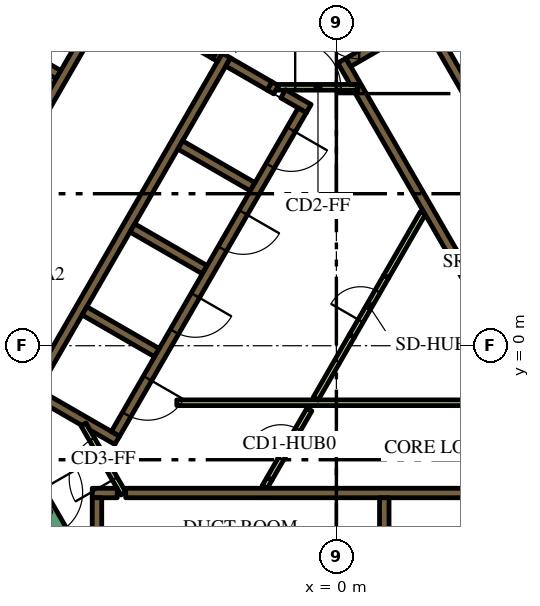
"""IFC4 building model, lengths in metres.
Left out: names, types, materials, properties, quantities, classifications, styles, units other than length and angle.
Written with IfcOpenShell. Run it as: python <this file> out.ifc"""

import sys

from ifc_helpers import new_model, si_unit, direction, frame, frame_2d, origin, place, context, subcontext, project, spatial, polyline, rectangle, outline, extrude, element, fill, save


model = new_model("IFC4")
c1 = context("Model", 3, precision=1e-05, world=origin(), true_north=direction((0.0, 1.0)))
c2 = subcontext(c1, "Body", "Model", "MODEL_VIEW")
j1 = project(units=[si_unit("LENGTHUNIT", "METRE"), si_unit("PLANEANGLEUNIT", "RADIAN")], contexts=[c1])
p1 = place(None, origin())
s1 = spatial("IfcSite", under=j1, at=p1, CompositionType="ELEMENT")
p2 = place(p1, origin())
s2 = spatial("IfcBuilding", under=s1, at=p2, CompositionType="ELEMENT")
p3 = place(p2, frame((0.0, 0.0, 91.5)))
s3 = spatial("IfcBuildingStorey", under=s2, at=p3, CompositionType="ELEMENT", Elevation=91.5)
p4 = place(p3, frame((-15.36, -1.503, 0.0), z_axis=(0.0, 0.0, 1.0), x_axis=(0.50000389221, 0.866023156604, 0.0)))
e1 = element("IfcWall", 1, at=p4, inside=s3, PredefinedType="SOLIDWALL", context=c2, shape_type="SweptSolid", body=[
    extrude(rectangle(XDim=21.0, YDim=0.9, at=frame_2d((10.5, 0.0))), origin(), (0.0, 0.0, 1.0), 3.9),
])
p5 = place(p3, frame((-5.545, -3.875, 0.0), z_axis=(0.0, 0.0, 1.0), x_axis=(1.0, 0.0, 0.0)))
e2 = element("IfcWall", 2, at=p5, inside=s3, PredefinedType="SOLIDWALL", context=c2, shape_type="SweptSolid", body=[
    extrude(rectangle(XDim=11.97, YDim=0.25, at=frame_2d((5.985, 0.0))), origin(), (0.0, 0.0, 1.0), 3.9),
])
p6 = place(p3, frame((-6.425, -3.875, 0.0), z_axis=(0.0, 0.0, 1.0), x_axis=(1.0, 0.0, 0.0)))
e3 = element("IfcWall", 3, at=p6, inside=s3, PredefinedType="SOLIDWALL", context=c2, shape_type="SweptSolid", body=[
    extrude(rectangle(XDim=0.658, YDim=0.25, at=frame_2d((0.329, 0.0))), origin(), (0.0, 0.0, 1.0), 3.9),
])
p7 = place(p3, frame((1.26, -4.0, 0.0), z_axis=(0.0, 0.0, 1.0), x_axis=(0.0, -1.0, 0.0)))
e4 = element("IfcWall", 4, at=p7, inside=s3, PredefinedType="SOLIDWALL", context=c2, shape_type="SweptSolid", body=[
    extrude(rectangle(XDim=2.2, YDim=0.25, at=frame_2d((1.1, 0.0))), origin(), (0.0, 0.0, 1.0), 3.9),
])
p8 = place(p3, frame((-6.3, -4.0, 0.0), z_axis=(0.0, 0.0, 1.0), x_axis=(0.0, -1.0, 0.0)))
e5 = element("IfcWall", 5, at=p8, inside=s3, PredefinedType="SOLIDWALL", context=c2, shape_type="SweptSolid", body=[
    extrude(rectangle(XDim=3.154, YDim=0.25, at=frame_2d((1.577, 0.0))), origin(), (0.0, 0.0, 1.0), 3.9),
])
p9 = place(p3, origin())
e6 = element("IfcWall", 6, at=p9, inside=s3, PredefinedType="SOLIDWALL", context=c2, shape_type="SweptSolid", body=[
    extrude(outline(polyline([(0.566, 6.725), (0.566, 6.875), (0.566, 6.875), (0.565, 6.875), (0.361, 6.875), (0.035, 7.439), (0.252, 7.564), (0.377, 7.348), (6.552, -3.348), (6.677, -3.564), (6.46, -3.689), (0.448, 6.725), (0.565, 6.725), (0.566, 6.725), (0.566, 6.725)])), origin(), (0.0, 0.0, 1.0), 3.9),
])
p10 = place(p3, frame((0.314, 7.456, 0.0), z_axis=(0.0, 0.0, 1.0), x_axis=(0.866013897511, 0.50001992892, 0.0)))
e7 = element("IfcWall", 7, at=p10, inside=s3, PredefinedType="SOLIDWALL", context=c2, shape_type="SweptSolid", body=[
    extrude(rectangle(XDim=3.268, YDim=0.25, at=frame_2d((1.634, 0.0))), origin(), (0.0, 0.0, 1.0), 3.9),
])
p11 = place(p3, frame((-8.06, -1.311, 0.0), z_axis=(0.0, 0.0, 1.0), x_axis=(0.50000273126, 0.866023826885, 0.0)))
e8 = element("IfcWall", 8, at=p11, inside=s3, PredefinedType="SOLIDWALL", context=c2, shape_type="SweptSolid", body=[
    extrude(rectangle(XDim=10.33, YDim=0.25, at=frame_2d((5.165, 0.0))), origin(), (0.0, 0.0, 1.0), 3.9),
])
p12 = place(p3, frame((-1.758, 6.835, 0.0), z_axis=(0.0, 0.0, 1.0), x_axis=(0.865982457891, -0.500074377092, 0.0)))
e9 = element("IfcWall", 9, at=p12, inside=s3, PredefinedType="SOLIDWALL", context=c2, shape_type="SweptSolid", body=[
    extrude(rectangle(XDim=0.2, YDim=0.25, at=frame_2d((0.1, 0.0))), origin(), (0.0, 0.0, 1.0), 3.9),
])
p13 = place(p3, frame((-1.76, 6.836, 0.0), z_axis=(0.0, 0.0, 1.0), x_axis=(-0.865952863304, 0.500125622755, 0.0)))
e10 = element("IfcWall", 10, at=p13, inside=s3, PredefinedType="SOLIDWALL", context=c2, shape_type="SweptSolid", body=[
    extrude(rectangle(XDim=1.258, YDim=0.25, at=frame_2d((0.629, 0.0))), origin(), (0.0, 0.0, 1.0), 3.9),
])
p14 = place(p3, frame((-0.728, 6.24, 0.0), z_axis=(0.0, 0.0, 1.0), x_axis=(-0.865955664968, 0.500120771724, 0.0)))
e11 = element("IfcWall", 11, at=p14, inside=s3, PredefinedType="SOLIDWALL", context=c2, shape_type="SweptSolid", body=[
    extrude(rectangle(XDim=0.778, YDim=0.25, at=frame_2d((0.389, 0.0))), origin(), (0.0, 0.0, 1.0), 3.9),
])
for number, where, z_axis, x_axis in (
    (12, (-2.204, 4.182, 0.0), (0.0, 0.0, 1.0), (-0.866, 0.5, 0.0)),
    (13, (-5.369, 3.1, 0.0), (0.0, 0.0, 1.0), (0.866, -0.5, 0.0)),
    (14, (-4.724, -0.182, 0.0), (0.0, 0.0, 1.0), (-0.866, 0.5, 0.0)),
):
    element("IfcWall", number, at=place(p3, frame(where, z_axis=z_axis, x_axis=x_axis)), inside=s3, PredefinedType="SOLIDWALL", context=c2, shape_type="SweptSolid", body=[
        extrude(rectangle(XDim=2.2, YDim=0.25, at=frame_2d((1.1, 0.0))), origin(), (0.0, 0.0, 1.0), 3.9),
    ])
e15 = element("IfcWall", 15, at=p9, inside=s3, PredefinedType="SOLIDWALL", context=c2, shape_type="SweptSolid", body=[
    extrude(outline(polyline([(-5.922, -2.257), (-5.922, -2.257), (-5.705, -2.382), (-5.83, -2.598), (-6.483, -2.221), (-6.591, -2.033), (-6.591, -2.033), (-6.7, -2.096), (-7.952, -1.373), (-7.827, -1.156), (-5.922, -2.257)])), origin(), (0.0, 0.0, 1.0), 3.9),
])
e16 = element("IfcWall", 16, at=p9, inside=s3, PredefinedType="SOLIDWALL", context=c2, shape_type="SweptSolid", body=[
    extrude(outline(polyline([(-3.128, 7.481), (-3.259, 7.557), (-3.134, 7.773), (-3.003, 7.698), (-3.128, 7.481)])), origin(), (0.0, 0.0, 1.0), 3.9),
])
p15 = place(p3, frame((-7.314, 7.132, 0.0), z_axis=(0.0, 0.0, 1.0), x_axis=(-0.866008176907, 0.50002983664, 0.0)))
e17 = element("IfcWall", 17, at=p15, inside=s3, PredefinedType="SOLIDWALL", context=c2, shape_type="SweptSolid", body=[
    extrude(rectangle(XDim=2.2, YDim=0.25, at=frame_2d((1.1, 0.0))), origin(), (0.0, 0.0, 1.0), 3.9),
])
p16 = place(p3, frame((-1.887, -3.718, 0.0), z_axis=(0.0, 0.0, 1.0), x_axis=(0.500165633897, 0.865929753888, 0.0)))
e18 = element("IfcWall", 18, at=p16, inside=s3, PredefinedType="PARTITIONING", context=c2, shape_type="SweptSolid", body=[
    extrude(rectangle(XDim=0.254, YDim=0.15, at=frame_2d((0.127, 0.0))), origin(), (0.0, 0.0, 1.0), 2.75),
])
p17 = place(p3, frame((-4.2, -1.5, 0.0), z_axis=(0.0, 0.0, 1.0), x_axis=(1.0, 0.0, 0.0)))
e19 = element("IfcWall", 19, at=p17, inside=s3, PredefinedType="PARTITIONING", context=c2, shape_type="SweptSolid", body=[
    extrude(rectangle(XDim=9.359, YDim=0.15, at=frame_2d((4.68, 0.0))), origin(), (0.0, 0.0, 1.0), 2.75),
])
p18 = place(p3, frame((-0.544, -1.393, 0.0), z_axis=(0.0, 0.0, 1.0), x_axis=(0.499928740635, 0.866066541489, 0.0)))
e20 = element("IfcWall", 20, at=p18, inside=s3, PredefinedType="PARTITIONING", context=c2, shape_type="SweptSolid", body=[
    extrude(rectangle(XDim=1.912, YDim=0.15, at=frame_2d((0.956, 0.0))), origin(), (0.0, 0.0, 1.0), 2.75),
])
p19 = place(p3, frame((1.312, 1.822, 0.0), z_axis=(0.0, 0.0, 1.0), x_axis=(0.500003549559, 0.866023354436, 0.0)))
e21 = element("IfcWall", 21, at=p19, inside=s3, PredefinedType="PARTITIONING", context=c2, shape_type="SweptSolid", body=[
    extrude(rectangle(XDim=1.93, YDim=0.15, at=frame_2d((0.965, 0.0))), origin(), (0.0, 0.0, 1.0), 2.75),
])
p20 = place(p3, frame((8.565, -2.185, 0.0), z_axis=(0.0, 0.0, 1.0), x_axis=(-0.499997954832, 0.866026584559, 0.0)))
e22 = element("IfcWall", 22, at=p20, inside=s3, PredefinedType="SOLIDWALL", context=c2, shape_type="SweptSolid", body=[
    extrude(rectangle(XDim=12.35, YDim=0.25, at=frame_2d((6.175, 0.0))), origin(), (0.0, 0.0, 1.0), 3.9),
])
p21 = place(p20, frame((5.725, 0.0, 0.0)))
e23 = element("IfcOpeningElement", 23, at=p21, cuts=e22, PredefinedType="OPENING", context=c2, shape_type="SweptSolid", body=[
    extrude(rectangle(XDim=0.9, YDim=2.1, at=frame_2d((0.45, 1.05))), frame((0.0, 0.135, 0.0), z_axis=(0.0, -1.0, 0.0), x_axis=(1.0, 0.0, 0.0)), (0.0, 0.0, 1.0), 0.27),
])
p22 = place(p3, frame((-6.008, 9.144, 0.0), z_axis=(0.0, 0.0, 1.0), x_axis=(-0.500006956611, -0.866021387346, 0.0)))
e24 = element("IfcWall", 24, at=p22, inside=s3, PredefinedType="SOLIDWALL", context=c2, shape_type="SweptSolid", body=[
    extrude(rectangle(XDim=9.83, YDim=0.25, at=frame_2d((4.915, 0.0))), origin(), (0.0, 0.0, 1.0), 3.9),
])
p23 = place(p22, frame((6.985, 0.0, 0.0)))
e25 = element("IfcOpeningElement", 25, at=p23, cuts=e24, PredefinedType="OPENING", context=c2, shape_type="SweptSolid", body=[
    extrude(rectangle(XDim=0.9, YDim=2.1, at=frame_2d((0.45, 1.05))), frame((0.0, 0.135, 0.0), z_axis=(0.0, -1.0, 0.0), x_axis=(1.0, 0.0, 0.0)), (0.0, 0.0, 1.0), 0.27),
])
p24 = place(p3, frame((-0.898, 6.194, 0.0), z_axis=(0.0, 0.0, 1.0), x_axis=(-0.499996202215, -0.866027596426, 0.0)))
e26 = element("IfcWall", 26, at=p24, inside=s3, PredefinedType="SOLIDWALL", context=c2, shape_type="SweptSolid", body=[
    extrude(rectangle(XDim=9.83, YDim=0.25, at=frame_2d((4.915, 0.0))), origin(), (0.0, 0.0, 1.0), 3.9),
])
p25 = place(p24, frame((0.585, 0.0, 0.0)))
e27 = element("IfcOpeningElement", 27, at=p25, cuts=e26, PredefinedType="OPENING", context=c2, shape_type="SweptSolid", body=[
    extrude(rectangle(XDim=1.1, YDim=2.1, at=frame_2d((0.55, 1.05))), frame((0.0, 0.135, 0.0), z_axis=(0.0, -1.0, 0.0), x_axis=(1.0, 0.0, 0.0)), (0.0, 0.0, 1.0), 0.27),
])
p26 = place(p24, frame((3.105, 0.0, 0.0)))
e28 = element("IfcOpeningElement", 28, at=p26, cuts=e26, PredefinedType="OPENING", context=c2, shape_type="SweptSolid", body=[
    extrude(rectangle(XDim=1.1, YDim=2.1, at=frame_2d((0.55, 1.05))), frame((0.0, 0.135, 0.0), z_axis=(0.0, -1.0, 0.0), x_axis=(1.0, 0.0, 0.0)), (0.0, 0.0, 1.0), 0.27),
])
p27 = place(p24, frame((5.625, 0.0, 0.0)))
e29 = element("IfcOpeningElement", 29, at=p27, cuts=e26, PredefinedType="OPENING", context=c2, shape_type="SweptSolid", body=[
    extrude(rectangle(XDim=1.1, YDim=2.1, at=frame_2d((0.55, 1.05))), frame((0.0, 0.135, 0.0), z_axis=(0.0, -1.0, 0.0), x_axis=(1.0, 0.0, 0.0)), (0.0, 0.0, 1.0), 0.27),
])
p28 = place(p24, frame((8.145, 0.0, 0.0)))
e30 = element("IfcOpeningElement", 30, at=p28, cuts=e26, PredefinedType="OPENING", context=c2, shape_type="SweptSolid", body=[
    extrude(rectangle(XDim=1.1, YDim=2.1, at=frame_2d((0.55, 1.05))), frame((0.0, 0.135, 0.0), z_axis=(0.0, -1.0, 0.0), x_axis=(1.0, 0.0, 0.0)), (0.0, 0.0, 1.0), 0.27),
])
p29 = place(p3, frame((-8.103, -3.466, 0.0), z_axis=(0.0, 0.0, 1.0), x_axis=(0.500078061341, -0.865980330357, 0.0)))
e31 = element("IfcWall", 31, at=p29, inside=s3, PredefinedType="SOLIDWALL", context=c2, shape_type="SweptSolid", body=[
    extrude(rectangle(XDim=2.1, YDim=0.4, at=frame_2d((1.05, 0.0))), origin(), (0.0, 0.0, 1.0), 3.9),
])
p30 = place(p29, frame((0.45, 0.0, 0.0)))
e32 = element("IfcOpeningElement", 32, at=p30, cuts=e31, PredefinedType="OPENING", context=c2, shape_type="SweptSolid", body=[
    extrude(rectangle(XDim=1.2, YDim=2.1, at=frame_2d((0.6, 1.05))), frame((0.0, 0.21, 0.0), z_axis=(0.0, -1.0, 0.0), x_axis=(1.0, 0.0, 0.0)), (0.0, 0.0, 1.0), 0.42),
])
p31 = place(p3, frame((-1.76, -3.498, 0.0), z_axis=(0.0, 0.0, 1.0), x_axis=(0.499977374825, 0.866038466041, 0.0)))
e33 = element("IfcWall", 33, at=p31, inside=s3, PredefinedType="PARTITIONING", context=c2, shape_type="SweptSolid", body=[
    extrude(rectangle(XDim=2.1, YDim=0.15, at=frame_2d((1.05, 0.0))), origin(), (0.0, 0.0, 1.0), 2.75),
])
p32 = place(p31, frame((0.6, 0.0, 0.0)))
e34 = element("IfcOpeningElement", 34, at=p32, cuts=e33, PredefinedType="OPENING", context=c2, shape_type="SweptSolid", body=[
    extrude(rectangle(XDim=0.9, YDim=2.1, at=frame_2d((0.45, 1.05))), frame((0.0, 0.085, 0.0), z_axis=(0.0, -1.0, 0.0), x_axis=(1.0, 0.0, 0.0)), (0.0, 0.0, 1.0), 0.17),
])
p33 = place(p3, frame((-1.534, 6.8, 0.0), z_axis=(0.0, 0.0, 1.0), x_axis=(1.0, 0.0, 0.0)))
e35 = element("IfcWall", 35, at=p33, inside=s3, PredefinedType="PARTITIONING", context=c2, shape_type="SweptSolid", body=[
    extrude(rectangle(XDim=2.1, YDim=0.15, at=frame_2d((1.05, 0.0))), origin(), (0.0, 0.0, 1.0), 2.75),
])
p34 = place(p33, frame((0.45, 0.0, 0.0)))
e36 = element("IfcOpeningElement", 36, at=p34, cuts=e35, PredefinedType="OPENING", context=c2, shape_type="SweptSolid", body=[
    extrude(rectangle(XDim=1.2, YDim=2.1, at=frame_2d((0.6, 1.05))), frame((0.0, 0.085, 0.0), z_axis=(0.0, -1.0, 0.0), x_axis=(1.0, 0.0, 0.0)), (0.0, 0.0, 1.0), 0.17),
])
p35 = place(p3, frame((-5.606, -3.89, 0.0), z_axis=(0.0, 0.0, 1.0), x_axis=(-0.500027713859, 0.866009402589, 0.0)))
e37 = element("IfcWall", 37, at=p35, inside=s3, PredefinedType="PARTITIONING", context=c2, shape_type="SweptSolid", body=[
    extrude(rectangle(XDim=2.1, YDim=0.15, at=frame_2d((1.05, 0.0))), origin(), (0.0, 0.0, 1.0), 2.75),
])
p36 = place(p35, frame((0.45, 0.0, 0.0)))
e38 = element("IfcOpeningElement", 38, at=p36, cuts=e37, PredefinedType="OPENING", context=c2, shape_type="SweptSolid", body=[
    extrude(rectangle(XDim=1.2, YDim=2.1, at=frame_2d((0.6, 1.05))), frame((0.0, 0.085, 0.0), z_axis=(0.0, -1.0, 0.0), x_axis=(1.0, 0.0, 0.0)), (0.0, 0.0, 1.0), 0.17),
])
p37 = place(p3, frame((-4.409, 8.365, 0.0), z_axis=(0.0, 0.0, 1.0), x_axis=(0.866034573852, -0.49998411664, 0.0)))
e39 = element("IfcWall", 39, at=p37, inside=s3, PredefinedType="SOLIDWALL", context=c2, shape_type="SweptSolid", body=[
    extrude(rectangle(XDim=1.4, YDim=0.25, at=frame_2d((0.7, 0.0))), origin(), (0.0, 0.0, 1.0), 3.9),
])
p38 = place(p37, frame((0.1, 0.0, 0.0)))
e40 = element("IfcOpeningElement", 40, at=p38, cuts=e39, PredefinedType="OPENING", context=c2, shape_type="SweptSolid", body=[
    extrude(rectangle(XDim=1.2, YDim=2.1, at=frame_2d((0.6, 1.05))), frame((0.0, 0.135, 0.0), z_axis=(0.0, -1.0, 0.0), x_axis=(1.0, 0.0, 0.0)), (0.0, 0.0, 1.0), 0.27),
])
p39 = place(p3, frame((0.412, 0.263, 0.0), z_axis=(0.0, 0.0, 1.0), x_axis=(0.500062916607, 0.865989075817, 0.0)))
e41 = element("IfcWall", 41, at=p39, inside=s3, PredefinedType="PARTITIONING", context=c2, shape_type="SweptSolid", body=[
    extrude(rectangle(XDim=1.8, YDim=0.15, at=frame_2d((0.9, 0.0))), origin(), (0.0, 0.0, 1.0), 2.75),
])
p40 = place(p39, frame((0.45, 0.0, 0.0)))
e42 = element("IfcOpeningElement", 42, at=p40, cuts=e41, PredefinedType="OPENING", context=c2, shape_type="SweptSolid", body=[
    extrude(rectangle(XDim=0.9, YDim=2.1, at=frame_2d((0.45, 1.05))), frame((0.0, 0.085, 0.0), z_axis=(0.0, -1.0, 0.0), x_axis=(1.0, 0.0, 0.0)), (0.0, 0.0, 1.0), 0.17),
])
p41 = place(p3, frame((-19.081, -3.9, 0.0), z_axis=(0.0, 0.0, 1.0), x_axis=(0.499998313975, 0.866026377209, 0.0)))
e43 = element("IfcWall", 43, at=p41, inside=s3, PredefinedType="PARTITIONING", context=c2, shape_type="SweptSolid", body=[
    extrude(rectangle(XDim=25.766, YDim=0.15, at=frame_2d((12.883, 0.0))), origin(), (0.0, 0.0, 1.0), 2.75),
])
p42 = place(p41, frame((19.306, 0.0, 0.0)))
e44 = element("IfcOpeningElement", 44, at=p42, cuts=e43, PredefinedType="OPENING", context=c2, shape_type="SweptSolid", body=[
    extrude(rectangle(XDim=1.0, YDim=2.1, at=frame_2d((0.5, 1.05))), frame((0.0, 0.085, 0.0), z_axis=(0.0, -1.0, 0.0), x_axis=(1.0, 0.0, 0.0)), (0.0, 0.0, 1.0), 0.17),
])
p43 = place(p41, frame((18.0, 0.0, 0.0)))
e45 = element("IfcOpeningElement", 45, at=p43, cuts=e43, PredefinedType="OPENING", context=c2, shape_type="SweptSolid", body=[
    extrude(rectangle(XDim=1.0, YDim=2.1, at=frame_2d((0.5, 1.05))), frame((0.0, 0.085, 0.0), z_axis=(0.0, -1.0, 0.0), x_axis=(1.0, 0.0, 0.0)), (0.0, 0.0, 1.0), 0.17),
])
p44 = place(p41, frame((10.874, 0.0, 0.0)))
e46 = element("IfcOpeningElement", 46, at=p44, cuts=e43, PredefinedType="OPENING", context=c2, shape_type="SweptSolid", body=[
    extrude(rectangle(XDim=0.9, YDim=2.1, at=frame_2d((0.45, 1.05))), frame((0.0, 0.085, 0.0), z_axis=(0.0, -1.0, 0.0), x_axis=(1.0, 0.0, 0.0)), (0.0, 0.0, 1.0), 0.17),
])
p45 = place(p41, frame((8.548, 0.0, 0.0)))
e47 = element("IfcOpeningElement", 47, at=p45, cuts=e43, PredefinedType="OPENING", context=c2, shape_type="SweptSolid", body=[
    extrude(rectangle(XDim=1.1, YDim=2.1, at=frame_2d((0.55, 1.05))), frame((0.0, 0.085, 0.0), z_axis=(0.0, -1.0, 0.0), x_axis=(1.0, 0.0, 0.0)), (0.0, 0.0, 1.0), 0.17),
])
p46 = place(p41, frame((0.18, 0.0, 0.0)))
e48 = element("IfcOpeningElement", 48, at=p46, cuts=e43, PredefinedType="OPENING", context=c2, shape_type="SweptSolid", body=[
    extrude(rectangle(XDim=1.0, YDim=2.1, at=frame_2d((0.5, 1.05))), frame((0.0, 0.085, 0.0), z_axis=(0.0, -1.0, 0.0), x_axis=(1.0, 0.0, 0.0)), (0.0, 0.0, 1.0), 0.17),
])
p47 = place(p25, origin())
e49 = element("IfcDoor", 49, at=p47, inside=s3, OperationType="DOUBLE_DOOR_SLIDING", PredefinedType="DOOR", context=c2, shape_type="SweptSolid", body=[
    extrude(rectangle(XDim=1.1, YDim=2.1, at=frame_2d((0.55, 1.05))), frame((0.0, 0.025, 0.0), z_axis=(0.0, -1.0, 0.0), x_axis=(1.0, 0.0, 0.0)), (0.0, 0.0, 1.0), 0.05),
])
fill(e27, e49)
p48 = place(p26, origin())
e50 = element("IfcDoor", 50, at=p48, inside=s3, OperationType="DOUBLE_DOOR_SLIDING", PredefinedType="DOOR", context=c2, shape_type="SweptSolid", body=[
    extrude(rectangle(XDim=1.1, YDim=2.1, at=frame_2d((0.55, 1.05))), frame((0.0, 0.025, 0.0), z_axis=(0.0, -1.0, 0.0), x_axis=(1.0, 0.0, 0.0)), (0.0, 0.0, 1.0), 0.05),
])
fill(e28, e50)
p49 = place(p27, origin())
e51 = element("IfcDoor", 51, at=p49, inside=s3, OperationType="DOUBLE_DOOR_SLIDING", PredefinedType="DOOR", context=c2, shape_type="SweptSolid", body=[
    extrude(rectangle(XDim=1.1, YDim=2.1, at=frame_2d((0.55, 1.05))), frame((0.0, 0.025, 0.0), z_axis=(0.0, -1.0, 0.0), x_axis=(1.0, 0.0, 0.0)), (0.0, 0.0, 1.0), 0.05),
])
fill(e29, e51)
p50 = place(p28, origin())
e52 = element("IfcDoor", 52, at=p50, inside=s3, OperationType="DOUBLE_DOOR_SLIDING", PredefinedType="DOOR", context=c2, shape_type="SweptSolid", body=[
    extrude(rectangle(XDim=1.1, YDim=2.1, at=frame_2d((0.55, 1.05))), frame((0.0, 0.025, 0.0), z_axis=(0.0, -1.0, 0.0), x_axis=(1.0, 0.0, 0.0)), (0.0, 0.0, 1.0), 0.05),
])
fill(e30, e52)
p51 = place(p30, origin())
e53 = element("IfcDoor", 53, at=p51, inside=s3, OperationType="SINGLE_SWING_LEFT", PredefinedType="DOOR", context=c2, shape_type="SweptSolid", body=[
    extrude(rectangle(XDim=1.2, YDim=2.1, at=frame_2d((0.6, 1.05))), frame((0.0, 0.025, 0.0), z_axis=(0.0, -1.0, 0.0), x_axis=(1.0, 0.0, 0.0)), (0.0, 0.0, 1.0), 0.05),
])
fill(e32, e53)
p52 = place(p32, origin())
e54 = element("IfcDoor", 54, at=p52, inside=s3, OperationType="SINGLE_SWING_LEFT", PredefinedType="DOOR", context=c2, shape_type="SweptSolid", body=[
    extrude(rectangle(XDim=0.9, YDim=2.1, at=frame_2d((0.45, 1.05))), frame((0.0, 0.025, 0.0), z_axis=(0.0, -1.0, 0.0), x_axis=(1.0, 0.0, 0.0)), (0.0, 0.0, 1.0), 0.05),
])
fill(e34, e54)
p53 = place(p34, origin())
e55 = element("IfcDoor", 55, at=p53, inside=s3, OperationType="SINGLE_SWING_LEFT", PredefinedType="DOOR", context=c2, shape_type="SweptSolid", body=[
    extrude(rectangle(XDim=1.2, YDim=2.1, at=frame_2d((0.6, 1.05))), frame((0.0, 0.025, 0.0), z_axis=(0.0, -1.0, 0.0), x_axis=(1.0, 0.0, 0.0)), (0.0, 0.0, 1.0), 0.05),
])
fill(e36, e55)
p54 = place(p36, origin())
e56 = element("IfcDoor", 56, at=p54, inside=s3, OperationType="SINGLE_SWING_LEFT", PredefinedType="DOOR", context=c2, shape_type="SweptSolid", body=[
    extrude(rectangle(XDim=1.2, YDim=2.1, at=frame_2d((0.6, 1.05))), frame((0.0, 0.025, 0.0), z_axis=(0.0, -1.0, 0.0), x_axis=(1.0, 0.0, 0.0)), (0.0, 0.0, 1.0), 0.05),
])
fill(e38, e56)
p55 = place(p38, origin())
e57 = element("IfcDoor", 57, at=p55, inside=s3, OperationType="SINGLE_SWING_LEFT", PredefinedType="DOOR", context=c2, shape_type="SweptSolid", body=[
    extrude(rectangle(XDim=1.2, YDim=2.1, at=frame_2d((0.6, 1.05))), frame((0.0, 0.025, 0.0), z_axis=(0.0, -1.0, 0.0), x_axis=(1.0, 0.0, 0.0)), (0.0, 0.0, 1.0), 0.05),
])
fill(e40, e57)
p56 = place(p40, origin())
e58 = element("IfcDoor", 58, at=p56, inside=s3, OperationType="SINGLE_SWING_LEFT", PredefinedType="DOOR", context=c2, shape_type="SweptSolid", body=[
    extrude(rectangle(XDim=0.9, YDim=2.1, at=frame_2d((0.45, 1.05))), frame((0.0, 0.025, 0.0), z_axis=(0.0, -1.0, 0.0), x_axis=(1.0, 0.0, 0.0)), (0.0, 0.0, 1.0), 0.05),
])
fill(e42, e58)
save(model, sys.argv[1])
